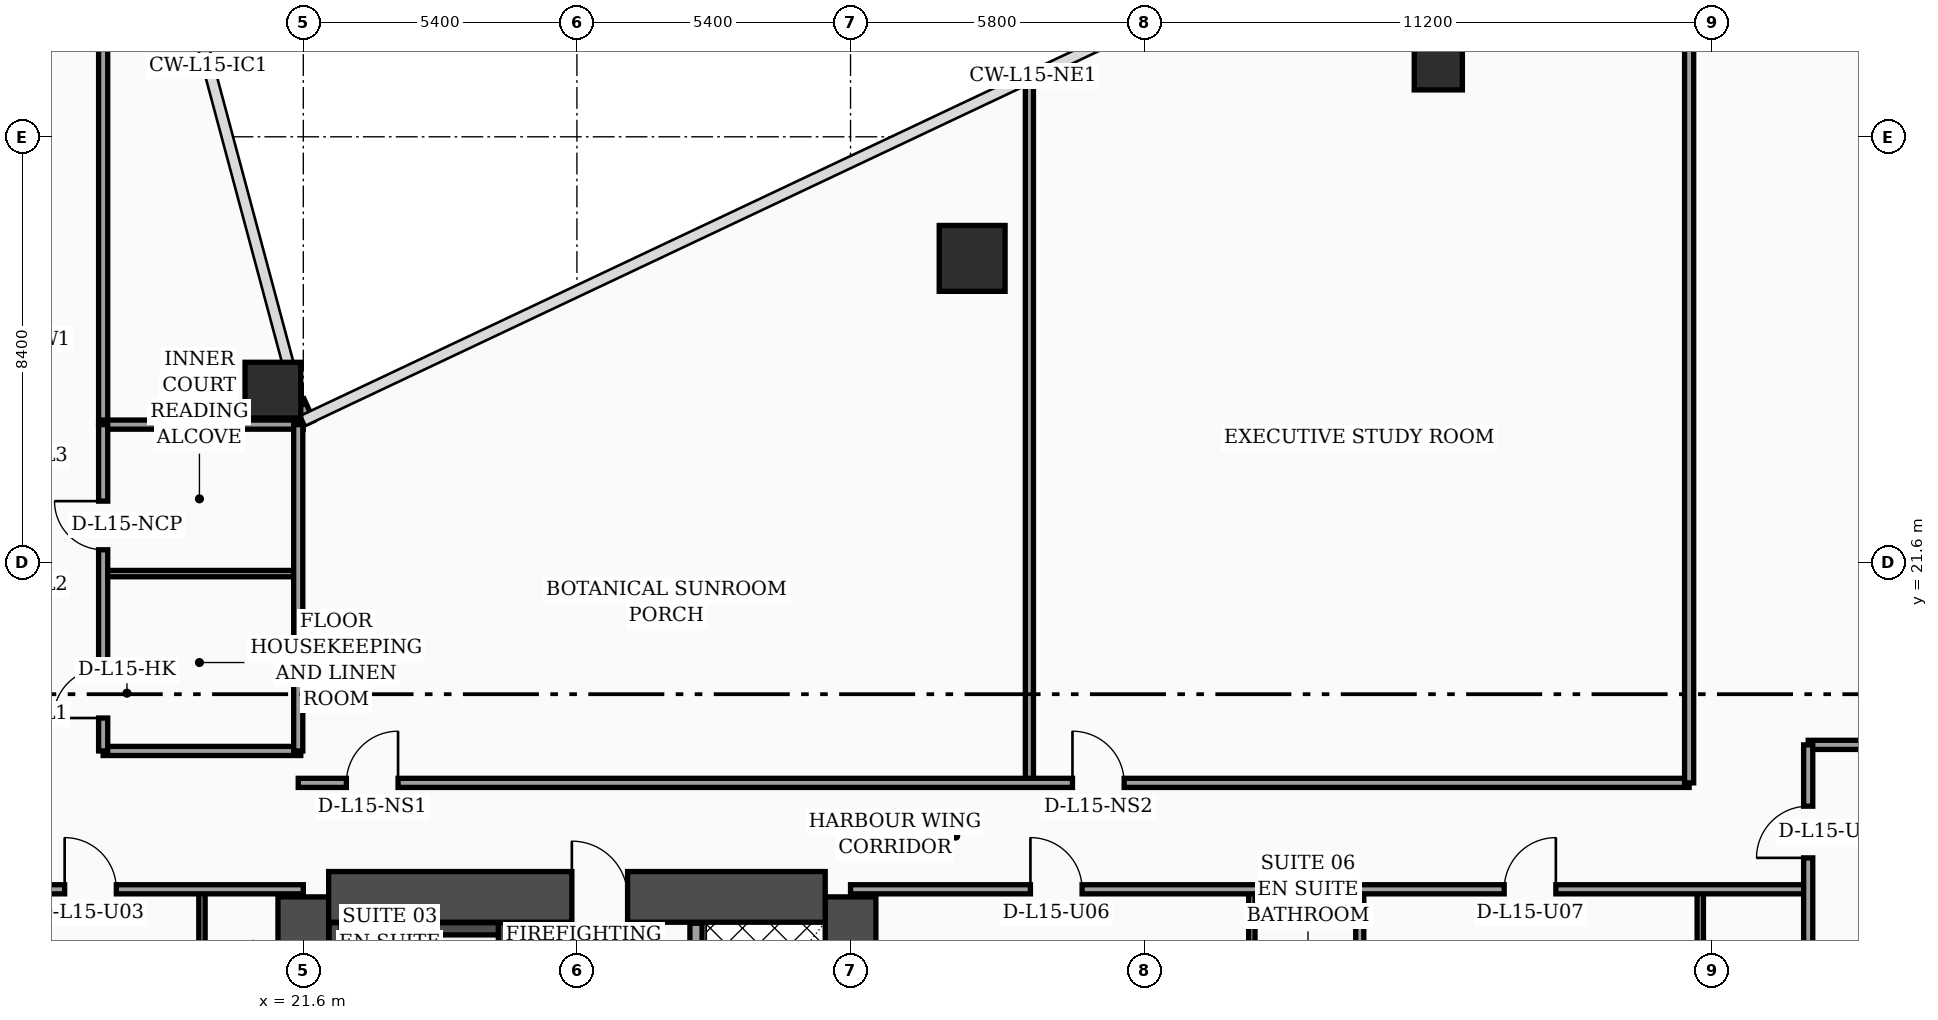
"""IFC4 building model, lengths in metres.
Left out: names, types, materials, properties, quantities, classifications, styles, units other than length and angle.
Written with IfcOpenShell. Run it as: python <this file> out.ifc"""

import sys

from ifc_helpers import new_model, si_unit, direction, frame, frame_2d, origin, origin_2d, place, context, subcontext, project, spatial, rectangle, hollow_rectangle, circle, extrude, element, fill, save


model = new_model("IFC4")
c1 = context("Model", 3, precision=1e-05, world=origin(), true_north=direction((0.0, 1.0)))
c2 = subcontext(c1, "Body", "Model", "MODEL_VIEW")
j1 = project(units=[si_unit("LENGTHUNIT", "METRE"), si_unit("PLANEANGLEUNIT", "RADIAN")], contexts=[c1])
p1 = place(None, origin())
s1 = spatial("IfcSite", under=j1, at=p1, CompositionType="ELEMENT")
p2 = place(p1, origin())
s2 = spatial("IfcBuilding", under=s1, at=p2, CompositionType="ELEMENT")
p3 = place(p2, frame((0.0, 0.0, 66.0)))
s3 = spatial("IfcBuildingStorey", under=s2, at=p3, CompositionType="ELEMENT", Elevation=66.0)
for number, where, z_axis, x_axis in (
    (1, (21.6, 4.6, 0.0), (0.0, 0.0, 1.0), (0.0, 1.0, 0.0)),
    (2, (32.4, 4.6, 0.0), (0.0, 0.0, 1.0), (0.0, 1.0, 0.0)),
):
    element("IfcWall", number, at=place(p3, frame(where, z_axis=z_axis, x_axis=x_axis)), inside=s3, PredefinedType="SHEAR", context=c2, shape_type="SweptSolid", body=[
        extrude(rectangle(XDim=10.4, YDim=1.0, at=frame_2d((5.2, 0.0))), origin(), (0.0, 0.0, 1.0), 3.56),
    ])
p4 = place(p3, frame((22.1, 15.0, 0.0), z_axis=(0.0, 0.0, 1.0), x_axis=(1.0, 0.0, 0.0)))
e3 = element("IfcWall", 3, at=p4, inside=s3, PredefinedType="SHEAR", context=c2, shape_type="SweptSolid", body=[
    extrude(rectangle(XDim=9.8, YDim=1.0, at=frame_2d((4.9, 0.0))), origin(), (0.0, 0.0, 1.0), 3.56),
])
p5 = place(p4, frame((4.8, 0.0, 0.0)))
e4 = element("IfcOpeningElement", 4, at=p5, cuts=e3, PredefinedType="OPENING", context=c2, shape_type="SweptSolid", body=[
    extrude(rectangle(XDim=1.1, YDim=2.2, at=frame_2d((0.55, 1.1))), frame((0.0, 0.51, 0.0), z_axis=(0.0, -1.0, 0.0), x_axis=(1.0, 0.0, 0.0)), (0.0, 0.0, 1.0), 1.02),
])
p6 = place(p3, frame((22.23, 5.1, 0.0), z_axis=(0.0, 0.0, 1.0), x_axis=(0.0, 1.0, 0.0)))
e5 = element("IfcWall", 5, at=p6, inside=s3, PredefinedType="SOLIDWALL", context=c2, shape_type="SweptSolid", body=[
    extrude(rectangle(XDim=9.39, YDim=0.24, at=frame_2d((4.695, 0.0))), origin(), (0.0, 0.0, 1.0), 3.56),
])
p7 = place(p3, frame((25.57, 5.1, 0.0), z_axis=(0.0, 0.0, 1.0), x_axis=(0.0, 1.0, 0.0)))
e6 = element("IfcWall", 6, at=p7, inside=s3, PredefinedType="SOLIDWALL", context=c2, shape_type="SweptSolid", body=[
    extrude(rectangle(XDim=9.39, YDim=0.24, at=frame_2d((4.695, 0.0))), origin(), (0.0, 0.0, 1.0), 3.56),
])
p8 = place(p7, frame((0.35, 0.0, 0.0)))
e7 = element("IfcOpeningElement", 7, at=p8, cuts=e6, PredefinedType="OPENING", context=c2, shape_type="SweptSolid", body=[
    extrude(rectangle(XDim=1.15, YDim=2.2, at=frame_2d((0.575, 1.1))), frame((0.0, 0.13, 0.0), z_axis=(0.0, -1.0, 0.0), x_axis=(1.0, 0.0, 0.0)), (0.0, 0.0, 1.0), 0.26),
])
p9 = place(p3, frame((22.35, 14.37, 0.0), z_axis=(0.0, 0.0, 1.0), x_axis=(1.0, 0.0, 0.0)))
e8 = element("IfcWall", 8, at=p9, inside=s3, PredefinedType="SOLIDWALL", context=c2, shape_type="SweptSolid", body=[
    extrude(rectangle(XDim=3.1, YDim=0.24, at=frame_2d((1.55, 0.0))), origin(), (0.0, 0.0, 1.0), 3.56),
])
p10 = place(p3, frame((21.0, 25.0, 0.0), z_axis=(0.0, 0.0, 1.0), x_axis=(1.0, 0.0, 0.0)))
e9 = element("IfcColumn", 9, at=p10, inside=s3, PredefinedType="COLUMN", context=c2, shape_type="SweptSolid", body=[
    extrude(hollow_rectangle(XDim=1.1, YDim=1.1, WallThickness=0.045, at=origin_2d()), origin(), (0.0, 0.0, 1.0), 3.56),
])
p11 = place(p3, frame((34.8, 27.6, 0.0), z_axis=(0.0, 0.0, 1.0), x_axis=(1.0, 0.0, 0.0)))
e10 = element("IfcColumn", 10, at=p11, inside=s3, PredefinedType="COLUMN", context=c2, shape_type="SweptSolid", body=[
    extrude(circle(Radius=0.65, at=origin_2d()), origin(), (0.0, 0.0, 1.0), 3.56),
])
p12 = place(p3, frame((44.0, 31.4, 0.0), z_axis=(0.0, 0.0, 1.0), x_axis=(1.0, 0.0, 0.0)))
e11 = element("IfcColumn", 11, at=p12, inside=s3, PredefinedType="COLUMN", context=c2, shape_type="SweptSolid", body=[
    extrude(hollow_rectangle(XDim=0.95, YDim=0.95, WallThickness=0.04, at=origin_2d()), origin(), (0.0, 0.0, 1.0), 3.56),
])
p13 = place(p3, frame((21.68, 24.34, 0.0), z_axis=(0.0, 0.0, 1.0), x_axis=(-0.40758134973, 0.913168901875, 0.0)))
e12 = element("IfcWall", 12, at=p13, inside=s3, PredefinedType="SOLIDWALL", context=c2, shape_type="SweptSolid", body=[
    extrude(rectangle(XDim=0.471, YDim=0.28, at=frame_2d((0.235, 0.0))), origin(), (0.0, 0.0, 1.0), 3.56),
])
p14 = place(p3, frame((29.35, 5.12, 0.0), z_axis=(0.0, 0.0, 1.0), x_axis=(0.0, 1.0, 0.0)))
e13 = element("IfcWall", 13, at=p14, inside=s3, PredefinedType="SOLIDWALL", context=c2, shape_type="SweptSolid", body=[
    extrude(rectangle(XDim=9.36, YDim=0.24, at=frame_2d((4.68, 0.0))), origin(), (0.0, 0.0, 1.0), 3.56),
])
p15 = place(p14, frame((0.55, 0.0, 0.0)))
e14 = element("IfcOpeningElement", 14, at=p15, cuts=e13, PredefinedType="OPENING", context=c2, shape_type="SweptSolid", body=[
    extrude(rectangle(XDim=1.3, YDim=2.35, at=frame_2d((0.65, 1.175))), frame((0.0, 0.13, 0.0), z_axis=(0.0, -1.0, 0.0), x_axis=(1.0, 0.0, 0.0)), (0.0, 0.0, 1.0), 0.26),
])
p16 = place(p3, frame((19.6, 2.44, 0.0), z_axis=(0.0, 0.0, 1.0), x_axis=(0.0, 1.0, 0.0)))
e15 = element("IfcWall", 15, at=p16, inside=s3, PredefinedType="PARTITIONING", context=c2, shape_type="SweptSolid", body=[
    extrude(rectangle(XDim=12.71, YDim=0.125, at=frame_2d((6.355, 0.0))), origin(), (0.0, 0.0, 1.0), 2.34),
])
p17 = place(p16, frame((4.34, 0.0, 0.0)))
e16 = element("IfcOpeningElement", 16, at=p17, cuts=e15, PredefinedType="OPENING", context=c2, shape_type="SweptSolid", body=[
    extrude(rectangle(XDim=0.96, YDim=2.2, at=frame_2d((0.48, 1.1))), frame((0.0, 0.073, 0.0), z_axis=(0.0, -1.0, 0.0), x_axis=(1.0, 0.0, 0.0)), (0.0, 0.0, 1.0), 0.145),
])
p18 = place(p16, frame((10.18, 0.0, 0.0)))
e17 = element("IfcOpeningElement", 17, at=p18, cuts=e15, PredefinedType="OPENING", context=c2, shape_type="SweptSolid", body=[
    extrude(rectangle(XDim=0.9, YDim=2.15, at=frame_2d((0.45, 1.075))), frame((0.0, 0.073, 0.0), z_axis=(0.0, -1.0, 0.0), x_axis=(1.0, 0.0, 0.0)), (0.0, 0.0, 1.0), 0.145),
])
p19 = place(p3, frame((15.15, 15.15, 0.0), z_axis=(0.0, 0.0, 1.0), x_axis=(1.0, 0.0, 0.0)))
e18 = element("IfcWall", 18, at=p19, inside=s3, PredefinedType="PARTITIONING", context=c2, shape_type="SweptSolid", body=[
    extrude(rectangle(XDim=6.45, YDim=0.18, at=frame_2d((3.225, 0.0))), origin(), (0.0, 0.0, 1.0), 2.34),
])
p20 = place(p19, frame((1.74, 0.0, 0.0)))
e19 = element("IfcOpeningElement", 19, at=p20, cuts=e18, PredefinedType="OPENING", context=c2, shape_type="SweptSolid", body=[
    extrude(rectangle(XDim=1.02, YDim=2.2, at=frame_2d((0.51, 1.1))), frame((0.0, 0.1, 0.0), z_axis=(0.0, -1.0, 0.0), x_axis=(1.0, 0.0, 0.0)), (0.0, 0.0, 1.0), 0.2),
])
p21 = place(p3, frame((17.65, 24.3, 0.0), z_axis=(0.0, 0.0, 1.0), x_axis=(0.0, 1.0, 0.0)))
e20 = element("IfcWall", 20, at=p21, inside=s3, PredefinedType="PARTITIONING", context=c2, shape_type="SweptSolid", body=[
    extrude(rectangle(XDim=16.4, YDim=0.18, at=frame_2d((8.2, 0.0))), origin(), (0.0, 0.0, 1.0), 2.84),
])
p22 = place(p3, frame((17.65, 17.88, 0.0), z_axis=(0.0, 0.0, 1.0), x_axis=(1.0, 0.0, 0.0)))
e21 = element("IfcWall", 21, at=p22, inside=s3, PredefinedType="PARTITIONING", context=c2, shape_type="SweptSolid", body=[
    extrude(rectangle(XDim=3.9, YDim=0.18, at=frame_2d((1.95, 0.0))), origin(), (0.0, 0.0, 1.0), 3.56),
])
p23 = place(p3, frame((17.65, 21.38, 0.0), z_axis=(0.0, 0.0, 1.0), x_axis=(1.0, 0.0, 0.0)))
e22 = element("IfcWall", 22, at=p23, inside=s3, PredefinedType="PARTITIONING", context=c2, shape_type="SweptSolid", body=[
    extrude(rectangle(XDim=3.9, YDim=0.125, at=frame_2d((1.95, 0.0))), origin(), (0.0, 0.0, 1.0), 3.09),
])
p24 = place(p3, frame((17.65, 24.32, 0.0), z_axis=(0.0, 0.0, 1.0), x_axis=(1.0, 0.0, 0.0)))
e23 = element("IfcWall", 23, at=p24, inside=s3, PredefinedType="PARTITIONING", context=c2, shape_type="SweptSolid", body=[
    extrude(rectangle(XDim=3.95, YDim=0.18, at=frame_2d((1.975, 0.0))), origin(), (0.0, 0.0, 1.0), 3.56),
])
p25 = place(p3, frame((21.5, 17.88, 0.0), z_axis=(0.0, 0.0, 1.0), x_axis=(0.0, 1.0, 0.0)))
e24 = element("IfcWall", 24, at=p25, inside=s3, PredefinedType="PARTITIONING", context=c2, shape_type="SweptSolid", body=[
    extrude(rectangle(XDim=6.44, YDim=0.18, at=frame_2d((3.22, 0.0))), origin(), (0.0, 0.0, 1.0), 3.09),
])
p26 = place(p3, frame((17.65, 17.88, 0.0), z_axis=(0.0, 0.0, 1.0), x_axis=(0.0, 1.0, 0.0)))
e25 = element("IfcWall", 25, at=p26, inside=s3, PredefinedType="PARTITIONING", context=c2, shape_type="SweptSolid", body=[
    extrude(rectangle(XDim=6.44, YDim=0.18, at=frame_2d((3.22, 0.0))), origin(), (0.0, 0.0, 1.0), 3.09),
])
p27 = place(p26, frame((0.65, 0.0, 0.0)))
e26 = element("IfcOpeningElement", 26, at=p27, cuts=e25, PredefinedType="OPENING", context=c2, shape_type="SweptSolid", body=[
    extrude(rectangle(XDim=0.98, YDim=2.15, at=frame_2d((0.49, 1.075))), frame((0.0, 0.1, 0.0), z_axis=(0.0, -1.0, 0.0), x_axis=(1.0, 0.0, 0.0)), (0.0, 0.0, 1.0), 0.2),
])
p28 = place(p26, frame((3.97, 0.0, 0.0)))
e27 = element("IfcOpeningElement", 27, at=p28, cuts=e25, PredefinedType="OPENING", context=c2, shape_type="SweptSolid", body=[
    extrude(rectangle(XDim=0.96, YDim=2.2, at=frame_2d((0.48, 1.1))), frame((0.0, 0.1, 0.0), z_axis=(0.0, -1.0, 0.0), x_axis=(1.0, 0.0, 0.0)), (0.0, 0.0, 1.0), 0.2),
])
p29 = place(p3, frame((40.32, 2.44, 0.0), z_axis=(0.0, 0.0, 1.0), x_axis=(0.0, 1.0, 0.0)))
e28 = element("IfcWall", 28, at=p29, inside=s3, PredefinedType="PARTITIONING", context=c2, shape_type="SweptSolid", body=[
    extrude(rectangle(XDim=12.71, YDim=0.125, at=frame_2d((6.355, 0.0))), origin(), (0.0, 0.0, 1.0), 2.84),
])
p30 = place(p29, frame((4.35, 0.0, 0.0)))
e29 = element("IfcOpeningElement", 29, at=p30, cuts=e28, PredefinedType="OPENING", context=c2, shape_type="SweptSolid", body=[
    extrude(rectangle(XDim=0.96, YDim=2.2, at=frame_2d((0.48, 1.1))), frame((0.0, 0.073, 0.0), z_axis=(0.0, -1.0, 0.0), x_axis=(1.0, 0.0, 0.0)), (0.0, 0.0, 1.0), 0.145),
])
p31 = place(p29, frame((10.21, 0.0, 0.0)))
e30 = element("IfcOpeningElement", 30, at=p31, cuts=e28, PredefinedType="OPENING", context=c2, shape_type="SweptSolid", body=[
    extrude(rectangle(XDim=0.9, YDim=2.15, at=frame_2d((0.45, 1.075))), frame((0.0, 0.073, 0.0), z_axis=(0.0, -1.0, 0.0), x_axis=(1.0, 0.0, 0.0)), (0.0, 0.0, 1.0), 0.145),
])
p32 = place(p3, frame((49.17, 2.44, 0.0), z_axis=(0.0, 0.0, 1.0), x_axis=(0.0, 1.0, 0.0)))
e31 = element("IfcWall", 31, at=p32, inside=s3, PredefinedType="PARTITIONING", context=c2, shape_type="SweptSolid", body=[
    extrude(rectangle(XDim=12.71, YDim=0.125, at=frame_2d((6.355, 0.0))), origin(), (0.0, 0.0, 1.0), 2.84),
])
p33 = place(p32, frame((4.35, 0.0, 0.0)))
e32 = element("IfcOpeningElement", 32, at=p33, cuts=e31, PredefinedType="OPENING", context=c2, shape_type="SweptSolid", body=[
    extrude(rectangle(XDim=0.96, YDim=2.2, at=frame_2d((0.48, 1.1))), frame((0.0, 0.073, 0.0), z_axis=(0.0, -1.0, 0.0), x_axis=(1.0, 0.0, 0.0)), (0.0, 0.0, 1.0), 0.145),
])
p34 = place(p32, frame((10.21, 0.0, 0.0)))
e33 = element("IfcOpeningElement", 33, at=p34, cuts=e31, PredefinedType="OPENING", context=c2, shape_type="SweptSolid", body=[
    extrude(rectangle(XDim=0.9, YDim=2.15, at=frame_2d((0.45, 1.075))), frame((0.0, 0.073, 0.0), z_axis=(0.0, -1.0, 0.0), x_axis=(1.0, 0.0, 0.0)), (0.0, 0.0, 1.0), 0.145),
])
p35 = place(p3, frame((42.45, 2.44, 0.0), z_axis=(0.0, 0.0, 1.0), x_axis=(0.0, 1.0, 0.0)))
e34 = element("IfcWall", 34, at=p35, inside=s3, PredefinedType="PARTITIONING", context=c2, shape_type="SweptSolid", body=[
    extrude(rectangle(XDim=12.71, YDim=0.16, at=frame_2d((6.355, 0.0))), origin(), (0.0, 0.0, 1.0), 3.04),
])
p36 = place(p3, frame((32.4, 15.15, 0.0), z_axis=(0.0, 0.0, 1.0), x_axis=(1.0, 0.0, 0.0)))
e35 = element("IfcWall", 35, at=p36, inside=s3, PredefinedType="PARTITIONING", context=c2, shape_type="SweptSolid", body=[
    extrude(rectangle(XDim=18.9, YDim=0.18, at=frame_2d((9.45, 0.0))), origin(), (0.0, 0.0, 1.0), 2.84),
])
p37 = place(p36, frame((3.55, 0.0, 0.0)))
e36 = element("IfcOpeningElement", 36, at=p37, cuts=e35, PredefinedType="OPENING", context=c2, shape_type="SweptSolid", body=[
    extrude(rectangle(XDim=1.02, YDim=2.2, at=frame_2d((0.51, 1.1))), frame((0.0, 0.1, 0.0), z_axis=(0.0, -1.0, 0.0), x_axis=(1.0, 0.0, 0.0)), (0.0, 0.0, 1.0), 0.2),
])
p38 = place(p36, frame((12.9, 0.0, 0.0)))
e37 = element("IfcOpeningElement", 37, at=p38, cuts=e35, PredefinedType="OPENING", context=c2, shape_type="SweptSolid", body=[
    extrude(rectangle(XDim=1.02, YDim=2.2, at=frame_2d((0.51, 1.1))), frame((0.0, 0.1, 0.0), z_axis=(0.0, -1.0, 0.0), x_axis=(1.0, 0.0, 0.0)), (0.0, 0.0, 1.0), 0.2),
])
p39 = place(p3, frame((35.93, 17.25, 0.0), z_axis=(0.0, 0.0, 1.0), x_axis=(0.0, 1.0, 0.0)))
e38 = element("IfcWall", 38, at=p39, inside=s3, PredefinedType="PARTITIONING", context=c2, shape_type="SweptSolid", body=[
    extrude(rectangle(XDim=14.0, YDim=0.16, at=frame_2d((7.0, 0.0))), origin(), (0.0, 0.0, 1.0), 2.84),
])
p40 = place(p3, frame((21.5, 17.25, 0.0), z_axis=(0.0, 0.0, 1.0), x_axis=(1.0, 0.0, 0.0)))
e39 = element("IfcWall", 39, at=p40, inside=s3, PredefinedType="PARTITIONING", context=c2, shape_type="SweptSolid", body=[
    extrude(rectangle(XDim=27.45, YDim=0.18, at=frame_2d((13.725, 0.0))), origin(), (0.0, 0.0, 1.0), 2.84),
])
p41 = place(p40, frame((0.95, 0.0, 0.0)))
e40 = element("IfcOpeningElement", 40, at=p41, cuts=e39, PredefinedType="OPENING", context=c2, shape_type="SweptSolid", body=[
    extrude(rectangle(XDim=1.02, YDim=2.2, at=frame_2d((0.51, 1.1))), frame((0.0, 0.1, 0.0), z_axis=(0.0, -1.0, 0.0), x_axis=(1.0, 0.0, 0.0)), (0.0, 0.0, 1.0), 0.2),
])
p42 = place(p40, frame((15.28, 0.0, 0.0)))
e41 = element("IfcOpeningElement", 41, at=p42, cuts=e39, PredefinedType="OPENING", context=c2, shape_type="SweptSolid", body=[
    extrude(rectangle(XDim=1.02, YDim=2.2, at=frame_2d((0.51, 1.1))), frame((0.0, 0.1, 0.0), z_axis=(0.0, -1.0, 0.0), x_axis=(1.0, 0.0, 0.0)), (0.0, 0.0, 1.0), 0.2),
])
p43 = place(p3, frame((48.95, 17.25, 0.0), z_axis=(0.0, 0.0, 1.0), x_axis=(0.0, 1.0, 0.0)))
e42 = element("IfcWall", 42, at=p43, inside=s3, PredefinedType="PARTITIONING", context=c2, shape_type="SweptSolid", body=[
    extrude(rectangle(XDim=20.15, YDim=0.18, at=frame_2d((10.075, 0.0))), origin(), (0.0, 0.0, 1.0), 2.84),
])
p44 = place(p3, frame((51.3, 18.0, 0.0), z_axis=(0.0, 0.0, 1.0), x_axis=(1.0, 0.0, 0.0)))
e43 = element("IfcWall", 43, at=p44, inside=s3, PredefinedType="PARTITIONING", context=c2, shape_type="SweptSolid", body=[
    extrude(rectangle(XDim=8.33, YDim=0.18, at=frame_2d((4.165, 0.0))), origin(), (0.0, 0.0, 1.0), 3.04),
])
p45 = place(p3, frame((51.3, 2.44, 0.0), z_axis=(0.0, 0.0, 1.0), x_axis=(0.0, 1.0, 0.0)))
e44 = element("IfcWall", 44, at=p45, inside=s3, PredefinedType="PARTITIONING", context=c2, shape_type="SweptSolid", body=[
    extrude(rectangle(XDim=15.56, YDim=0.18, at=frame_2d((7.78, 0.0))), origin(), (0.0, 0.0, 1.0), 3.04),
])
p46 = place(p45, frame((13.33, 0.0, 0.0)))
e45 = element("IfcOpeningElement", 45, at=p46, cuts=e44, PredefinedType="OPENING", context=c2, shape_type="SweptSolid", body=[
    extrude(rectangle(XDim=1.02, YDim=2.2, at=frame_2d((0.51, 1.1))), frame((0.0, 0.1, 0.0), z_axis=(0.0, -1.0, 0.0), x_axis=(1.0, 0.0, 0.0)), (0.0, 0.0, 1.0), 0.2),
])
p47 = place(p20, origin())
e46 = element("IfcDoor", 46, at=p47, inside=s3, OperationType="SINGLE_SWING_LEFT", PredefinedType="DOOR", context=c2, shape_type="SweptSolid", body=[
    extrude(rectangle(XDim=1.02, YDim=2.2, at=frame_2d((0.51, 1.1))), frame((0.0, 0.025, 0.0), z_axis=(0.0, -1.0, 0.0), x_axis=(1.0, 0.0, 0.0)), (0.0, 0.0, 1.0), 0.05),
])
fill(e19, e46)
p48 = place(p27, origin())
e47 = element("IfcDoor", 47, at=p48, inside=s3, OperationType="SINGLE_SWING_LEFT", PredefinedType="DOOR", context=c2, shape_type="SweptSolid", body=[
    extrude(rectangle(XDim=0.98, YDim=2.15, at=frame_2d((0.49, 1.075))), frame((0.0, 0.025, 0.0), z_axis=(0.0, -1.0, 0.0), x_axis=(1.0, 0.0, 0.0)), (0.0, 0.0, 1.0), 0.05),
])
fill(e26, e47)
p49 = place(p28, origin())
e48 = element("IfcDoor", 48, at=p49, inside=s3, OperationType="SINGLE_SWING_RIGHT", PredefinedType="DOOR", context=c2, shape_type="SweptSolid", body=[
    extrude(rectangle(XDim=0.96, YDim=2.2, at=frame_2d((0.48, 1.1))), frame((0.0, 0.025, 0.0), z_axis=(0.0, -1.0, 0.0), x_axis=(1.0, 0.0, 0.0)), (0.0, 0.0, 1.0), 0.05),
])
fill(e27, e48)
p50 = place(p37, origin())
e49 = element("IfcDoor", 49, at=p50, inside=s3, OperationType="SINGLE_SWING_LEFT", PredefinedType="DOOR", context=c2, shape_type="SweptSolid", body=[
    extrude(rectangle(XDim=1.02, YDim=2.2, at=frame_2d((0.51, 1.1))), frame((0.0, 0.025, 0.0), z_axis=(0.0, -1.0, 0.0), x_axis=(1.0, 0.0, 0.0)), (0.0, 0.0, 1.0), 0.05),
])
fill(e36, e49)
p51 = place(p38, origin())
e50 = element("IfcDoor", 50, at=p51, inside=s3, OperationType="SINGLE_SWING_RIGHT", PredefinedType="DOOR", context=c2, shape_type="SweptSolid", body=[
    extrude(rectangle(XDim=1.02, YDim=2.2, at=frame_2d((0.51, 1.1))), frame((0.0, 0.025, 0.0), z_axis=(0.0, -1.0, 0.0), x_axis=(1.0, 0.0, 0.0)), (0.0, 0.0, 1.0), 0.05),
])
fill(e37, e50)
p52 = place(p41, origin())
e51 = element("IfcDoor", 51, at=p52, inside=s3, OperationType="SINGLE_SWING_RIGHT", PredefinedType="DOOR", context=c2, shape_type="SweptSolid", body=[
    extrude(rectangle(XDim=1.02, YDim=2.2, at=frame_2d((0.51, 1.1))), frame((0.0, 0.025, 0.0), z_axis=(0.0, -1.0, 0.0), x_axis=(1.0, 0.0, 0.0)), (0.0, 0.0, 1.0), 0.05),
])
fill(e40, e51)
p53 = place(p42, origin())
e52 = element("IfcDoor", 52, at=p53, inside=s3, OperationType="SINGLE_SWING_LEFT", PredefinedType="DOOR", context=c2, shape_type="SweptSolid", body=[
    extrude(rectangle(XDim=1.02, YDim=2.2, at=frame_2d((0.51, 1.1))), frame((0.0, 0.025, 0.0), z_axis=(0.0, -1.0, 0.0), x_axis=(1.0, 0.0, 0.0)), (0.0, 0.0, 1.0), 0.05),
])
fill(e41, e52)
p54 = place(p46, origin())
e53 = element("IfcDoor", 53, at=p54, inside=s3, OperationType="SINGLE_SWING_LEFT", PredefinedType="DOOR", context=c2, shape_type="SweptSolid", body=[
    extrude(rectangle(XDim=1.02, YDim=2.2, at=frame_2d((0.51, 1.1))), frame((0.0, 0.025, 0.0), z_axis=(0.0, -1.0, 0.0), x_axis=(1.0, 0.0, 0.0)), (0.0, 0.0, 1.0), 0.05),
])
fill(e45, e53)
p55 = place(p5, origin())
e54 = element("IfcDoor", 54, at=p55, inside=s3, OperationType="SINGLE_SWING_LEFT", PredefinedType="DOOR", context=c2, shape_type="SweptSolid", body=[
    extrude(rectangle(XDim=1.1, YDim=2.2, at=frame_2d((0.55, 1.1))), frame((0.0, 0.025, 0.0), z_axis=(0.0, -1.0, 0.0), x_axis=(1.0, 0.0, 0.0)), (0.0, 0.0, 1.0), 0.05),
])
fill(e4, e54)
save(model, sys.argv[1])
